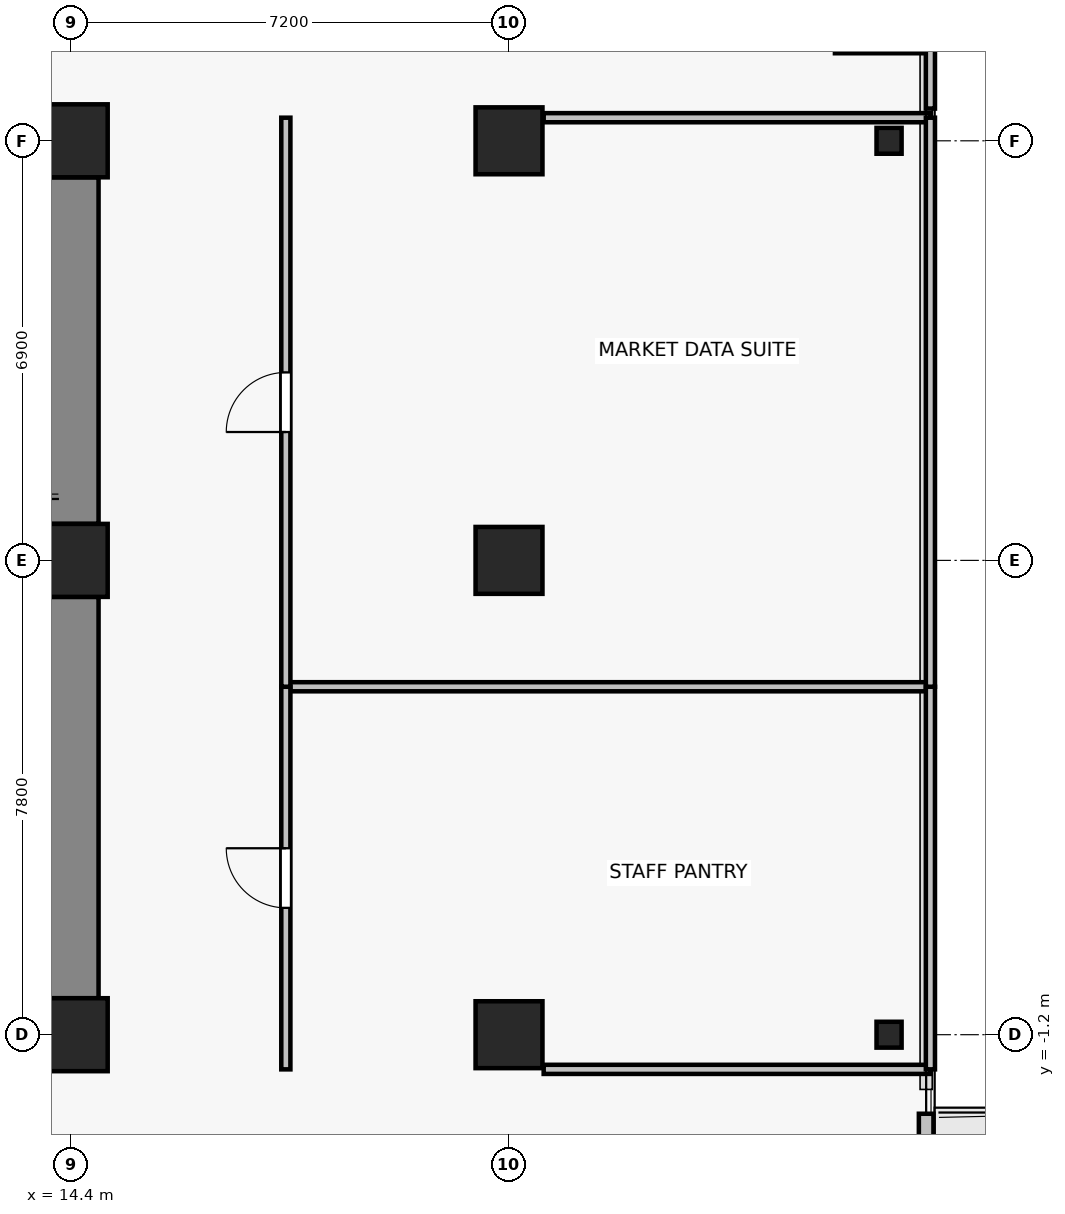
"""IFC4 building model, lengths in metres.
Left out: names, types, materials, properties, quantities, classifications, styles, units other than length and angle.
Written with IfcOpenShell. Run it as: python <this file> out.ifc"""

import sys

from ifc_helpers import new_model, si_unit, direction, frame, frame_2d, origin, origin_2d, place, context, subcontext, project, spatial, rectangle, i_section, extrude, source, transform, mapped, element, fill, save


model = new_model("IFC4")
c1 = context("Model", 3, precision=1e-05, world=origin(), true_north=direction((0.0, 1.0)))
c2 = subcontext(c1, "Body", "Model", "MODEL_VIEW")
j1 = project(units=[si_unit("LENGTHUNIT", "METRE"), si_unit("PLANEANGLEUNIT", "RADIAN")], contexts=[c1])
p1 = place(None, origin())
s1 = spatial("IfcSite", under=j1, at=p1, CompositionType="ELEMENT")
p2 = place(p1, origin())
s2 = spatial("IfcBuilding", under=s1, at=p2, CompositionType="ELEMENT")
p3 = place(p2, frame((0.0, 0.0, 30.7)))
s3 = spatial("IfcBuildingStorey", under=s2, at=p3, CompositionType="ELEMENT", Elevation=30.7)
for number, where, z_axis, x_axis in (
    (1, (14.4, -1.2, 0.0), (0.0, 0.0, 1.0), (1.0, 0.0, 0.0)),
    (2, (14.4, 6.6, 0.0), (0.0, 0.0, 1.0), (1.0, 0.0, 0.0)),
    (3, (14.4, 13.5, 0.0), (0.0, 0.0, 1.0), (1.0, 0.0, 0.0)),
):
    element("IfcColumn", number, at=place(p3, frame(where, z_axis=z_axis, x_axis=x_axis)), inside=s3, PredefinedType="COLUMN", context=c2, shape_type="SweptSolid", body=[
        extrude(rectangle(XDim=1.2, YDim=1.2, at=origin_2d()), origin(), (0.0, 0.0, 1.0), 3.3),
    ])
for number, where, z_axis, x_axis in (
    (4, (21.6, -1.2, 0.0), (0.0, 0.0, 1.0), (1.0, 0.0, 0.0)),
    (5, (21.6, 6.6, 0.0), (0.0, 0.0, 1.0), (1.0, 0.0, 0.0)),
    (6, (21.6, 13.5, 0.0), (0.0, 0.0, 1.0), (1.0, 0.0, 0.0)),
):
    element("IfcColumn", number, at=place(p3, frame(where, z_axis=z_axis, x_axis=x_axis)), inside=s3, PredefinedType="COLUMN", context=c2, shape_type="SweptSolid", body=[
        extrude(rectangle(XDim=1.1, YDim=1.1, at=origin_2d()), origin(), (0.0, 0.0, 1.0), 3.3),
    ])
for number, where, z_axis, x_axis in (
    (7, (27.85, -1.2, 0.0), (0.0, 0.0, 1.0), (1.0, 0.0, 0.0)),
    (8, (27.85, 13.5, 0.0), (0.0, 0.0, 1.0), (1.0, 0.0, 0.0)),
):
    element("IfcColumn", number, at=place(p3, frame(where, z_axis=z_axis, x_axis=x_axis)), inside=s3, PredefinedType="COLUMN", context=c2, shape_type="SweptSolid", body=[
        extrude(i_section(OverallWidth=0.412, OverallDepth=0.425, WebThickness=0.026, FlangeThickness=0.039, FilletRadius=0.015, at=origin_2d()), origin(), (0.0, 0.0, 1.0), 3.3),
    ])
p4 = place(p3, frame((14.4, -0.6, 0.0), z_axis=(0.0, 0.0, 1.0), x_axis=(0.0, 1.0, 0.0)))
e9 = element("IfcWall", 9, at=p4, inside=s3, PredefinedType="SHEAR", context=c2, shape_type="SweptSolid", body=[
    extrude(rectangle(XDim=6.6, YDim=0.9, at=frame_2d((3.3, 0.0))), origin(), (0.0, 0.0, 1.0), 3.075),
])
p5 = place(p3, frame((14.4, 7.2, 0.0), z_axis=(0.0, 0.0, 1.0), x_axis=(0.0, 1.0, 0.0)))
e10 = element("IfcWall", 10, at=p5, inside=s3, PredefinedType="SHEAR", context=c2, shape_type="SweptSolid", body=[
    extrude(rectangle(XDim=5.7, YDim=0.9, at=frame_2d((2.85, 0.0))), origin(), (0.0, 0.0, 1.0), 3.075),
])
p6 = place(p3, frame((28.46, -2.5, 0.0), z_axis=(0.0, 0.0, 1.0), x_axis=(0.0, -1.0, 0.0)))
e11 = element("IfcWall", 11, at=p6, inside=s3, PredefinedType="SOLIDWALL", context=c2, shape_type="SweptSolid", body=[
    extrude(rectangle(XDim=5.8, YDim=0.24, at=frame_2d((2.9, 0.0))), origin(), (0.0, 0.0, 1.0), 3.075),
])
p7 = place(p6, frame((1.566, 0.0, 0.0)))
e12 = element("IfcOpeningElement", 12, at=p7, cuts=e11, PredefinedType="OPENING", context=c2, shape_type="SweptSolid", body=[
    extrude(rectangle(XDim=1.0, YDim=2.2, at=frame_2d((0.5, 1.1))), frame((0.0, 0.13, 0.0), z_axis=(0.0, -1.0, 0.0), x_axis=(1.0, 0.0, 0.0)), (0.0, 0.0, 1.0), 0.26),
])
p8 = place(p6, frame((2.916, 0.0, 0.85)))
e13 = element("IfcOpeningElement", 13, at=p8, cuts=e11, PredefinedType="OPENING", context=c2, shape_type="SweptSolid", body=[
    extrude(rectangle(XDim=1.5, YDim=1.6, at=frame_2d((0.75, 0.8))), frame((0.0, 0.13, 0.0), z_axis=(0.0, -1.0, 0.0), x_axis=(1.0, 0.0, 0.0)), (0.0, 0.0, 1.0), 0.26),
])
p9 = place(p3, frame((28.46, 15.06, 0.0), z_axis=(0.0, 0.0, 1.0), x_axis=(-1.0, 0.0, 0.0)))
e14 = element("IfcWall", 14, at=p9, inside=s3, PredefinedType="SOLIDWALL", context=c2, shape_type="SweptSolid", body=[
    extrude(rectangle(XDim=1.5, YDim=0.24, at=frame_2d((0.75, 0.0))), origin(), (0.0, 0.0, 1.0), 3.075),
])
p10 = place(p3, frame((28.53, -1.77, 0.0), z_axis=(0.0, 0.0, 1.0), x_axis=(-1.0, 0.0, 0.0)))
e15 = element("IfcWall", 15, at=p10, inside=s3, PredefinedType="PARTITIONING", context=c2, shape_type="SweptSolid", body=[
    extrude(rectangle(XDim=6.36, YDim=0.15, at=frame_2d((3.18, 0.0))), origin(), (0.0, 0.0, 1.0), 2.465),
])
p11 = place(p3, frame((17.93, 4.522, 0.0), z_axis=(0.0, 0.0, 1.0), x_axis=(1.0, 0.0, 0.0)))
e16 = element("IfcWall", 16, at=p11, inside=s3, PredefinedType="PARTITIONING", context=c2, shape_type="SweptSolid", body=[
    extrude(rectangle(XDim=10.6, YDim=0.15, at=frame_2d((5.3, 0.0))), origin(), (0.0, 0.0, 1.0), 2.465),
])
p12 = place(p3, frame((17.93, -1.77, 0.0), z_axis=(0.0, 0.0, 1.0), x_axis=(0.0, 1.0, 0.0)))
e17 = element("IfcWall", 17, at=p12, inside=s3, PredefinedType="PARTITIONING", context=c2, shape_type="SweptSolid", body=[
    extrude(rectangle(XDim=6.292, YDim=0.15, at=frame_2d((3.146, 0.0))), origin(), (0.0, 0.0, 1.0), 2.465),
])
p13 = place(p12, frame((2.656, 0.0, 0.0)))
e18 = element("IfcOpeningElement", 18, at=p13, cuts=e17, PredefinedType="OPENING", context=c2, shape_type="SweptSolid", body=[
    extrude(rectangle(XDim=0.98, YDim=2.15, at=frame_2d((0.49, 1.075))), frame((0.0, 0.085, 0.0), z_axis=(0.0, -1.0, 0.0), x_axis=(1.0, 0.0, 0.0)), (0.0, 0.0, 1.0), 0.17),
])
p14 = place(p3, frame((28.53, 4.522, 0.0), z_axis=(0.0, 0.0, 1.0), x_axis=(0.0, -1.0, 0.0)))
e19 = element("IfcWall", 19, at=p14, inside=s3, PredefinedType="PARTITIONING", context=c2, shape_type="SweptSolid", body=[
    extrude(rectangle(XDim=6.292, YDim=0.15, at=frame_2d((3.146, 0.0))), origin(), (0.0, 0.0, 1.0), 3.075),
])
p15 = place(p3, frame((22.17, 13.88, 0.0), z_axis=(0.0, 0.0, 1.0), x_axis=(1.0, 0.0, 0.0)))
e20 = element("IfcWall", 20, at=p15, inside=s3, PredefinedType="PARTITIONING", context=c2, shape_type="SweptSolid", body=[
    extrude(rectangle(XDim=6.36, YDim=0.15, at=frame_2d((3.18, 0.0))), origin(), (0.0, 0.0, 1.0), 3.075),
])
p16 = place(p3, frame((17.93, 4.522, 0.0), z_axis=(0.0, 0.0, 1.0), x_axis=(0.0, 1.0, 0.0)))
e21 = element("IfcWall", 21, at=p16, inside=s3, PredefinedType="PARTITIONING", context=c2, shape_type="SweptSolid", body=[
    extrude(rectangle(XDim=9.358, YDim=0.15, at=frame_2d((4.679, 0.0))), origin(), (0.0, 0.0, 1.0), 2.465),
])
p17 = place(p16, frame((4.189, 0.0, 0.0)))
e22 = element("IfcOpeningElement", 22, at=p17, cuts=e21, PredefinedType="OPENING", context=c2, shape_type="SweptSolid", body=[
    extrude(rectangle(XDim=0.98, YDim=2.15, at=frame_2d((0.49, 1.075))), frame((0.0, 0.085, 0.0), z_axis=(0.0, -1.0, 0.0), x_axis=(1.0, 0.0, 0.0)), (0.0, 0.0, 1.0), 0.17),
])
p18 = place(p3, frame((28.53, 13.88, 0.0), z_axis=(0.0, 0.0, 1.0), x_axis=(0.0, -1.0, 0.0)))
e23 = element("IfcWall", 23, at=p18, inside=s3, PredefinedType="PARTITIONING", context=c2, shape_type="SweptSolid", body=[
    extrude(rectangle(XDim=9.358, YDim=0.15, at=frame_2d((4.679, 0.0))), origin(), (0.0, 0.0, 1.0), 3.075),
])
p19 = place(p3, frame((28.53, 18.13, 0.0), z_axis=(0.0, 0.0, 1.0), x_axis=(0.0, -1.0, 0.0)))
e24 = element("IfcWall", 24, at=p19, inside=s3, PredefinedType="PARTITIONING", context=c2, shape_type="SweptSolid", body=[
    extrude(rectangle(XDim=4.1, YDim=0.15, at=frame_2d((2.05, 0.0))), origin(), (0.0, 0.0, 1.0), 3.075),
])
m1 = source(origin(), c2, "Body", "SweptSolid", [
    extrude(rectangle(XDim=0.98, YDim=2.15, at=frame_2d((0.49, 1.075))), frame((0.0, 0.025, 0.0), z_axis=(0.0, -1.0, 0.0), x_axis=(1.0, 0.0, 0.0)), (0.0, 0.0, 1.0), 0.05),
])
p20 = place(p13, origin())
e25 = element("IfcDoor", 25, at=p20, inside=s3, OperationType="SINGLE_SWING_RIGHT", PredefinedType="DOOR", context=c2, shape_type="MappedRepresentation", body=[
    mapped(m1, transform((0.0, 0.0, 0.0), x_axis=(1.0, 0.0, 0.0), y_axis=(0.0, 1.0, 0.0), z_axis=(0.0, 0.0, 1.0), scale=1.0)),
])
fill(e18, e25)
p21 = place(p17, origin())
e26 = element("IfcDoor", 26, at=p21, inside=s3, OperationType="SINGLE_SWING_LEFT", PredefinedType="DOOR", context=c2, shape_type="MappedRepresentation", body=[
    mapped(m1, transform((0.0, 0.0, 0.0), x_axis=(1.0, 0.0, 0.0), y_axis=(0.0, 1.0, 0.0), z_axis=(0.0, 0.0, 1.0), scale=1.0)),
])
fill(e22, e26)
save(model, sys.argv[1])
